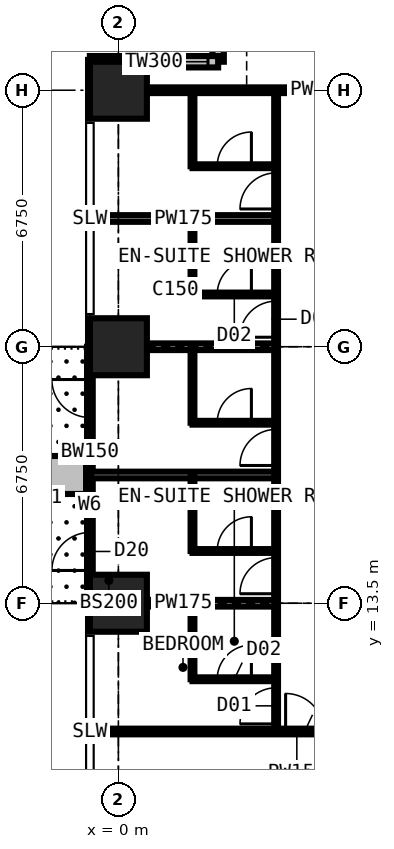
"""IFC4 building model, lengths in metres.
Left out: names, types, materials, properties, quantities, classifications, styles, units other than length and angle.
Written with IfcOpenShell. Run it as: python <this file> out.ifc"""

import sys

from ifc_helpers import new_model, si_unit, direction, frame, frame_2d, origin, origin_2d, place, context, subcontext, project, spatial, rectangle, extrude, element, fill, save


model = new_model("IFC4")
c1 = context("Model", 3, precision=1e-05, world=origin(), true_north=direction((0.0, 1.0)))
c2 = subcontext(c1, "Body", "Model", "MODEL_VIEW")
j1 = project(units=[si_unit("LENGTHUNIT", "METRE"), si_unit("PLANEANGLEUNIT", "RADIAN")], contexts=[c1])
p1 = place(None, origin())
s1 = spatial("IfcSite", under=j1, at=p1, CompositionType="ELEMENT")
p2 = place(p1, origin())
s2 = spatial("IfcBuilding", under=s1, at=p2, CompositionType="ELEMENT")
p3 = place(p2, frame((0.0, 0.0, 108.9)))
s3 = spatial("IfcBuildingStorey", under=s2, at=p3, CompositionType="ELEMENT", Elevation=108.9)
for number, where, z_axis, x_axis in (
    (1, (0.0, 13.5, 0.0), (0.0, 0.0, 1.0), (1.0, 0.0, 0.0)),
    (2, (0.0, 20.25, 0.0), (0.0, 0.0, 1.0), (1.0, 0.0, 0.0)),
    (3, (0.0, 27.0, 0.0), (0.0, 0.0, 1.0), (1.0, 0.0, 0.0)),
):
    element("IfcColumn", number, at=place(p3, frame(where, z_axis=z_axis, x_axis=x_axis)), inside=s3, PredefinedType="COLUMN", context=c2, shape_type="SweptSolid", body=[
        extrude(rectangle(XDim=1.5, YDim=1.5, at=origin_2d()), origin(), (0.0, 0.0, 1.0), 3.6),
    ])
p4 = place(p3, frame((2.625, 31.125, 0.0), z_axis=(0.0, 0.0, 1.0), x_axis=(0.0, -1.0, 0.0)))
e4 = element("IfcWall", 4, at=p4, inside=s3, PredefinedType="SOLIDWALL", context=c2, shape_type="SweptSolid", body=[
    extrude(rectangle(XDim=3.375, YDim=0.3, at=frame_2d((1.688, 0.0))), origin(), (0.0, 0.0, 1.0), 3.375),
])
p5 = place(p4, frame((0.788, 0.0, 0.6)))
e5 = element("IfcOpeningElement", 5, at=p5, cuts=e4, PredefinedType="OPENING", context=c2, shape_type="SweptSolid", body=[
    extrude(rectangle(XDim=1.8, YDim=2.1, at=frame_2d((0.9, 1.05))), frame((0.0, 0.16, 0.0), z_axis=(0.0, -1.0, 0.0), x_axis=(1.0, 0.0, 0.0)), (0.0, 0.0, 1.0), 0.32),
])
p6 = place(p3, frame((2.625, 27.75, 0.0), z_axis=(0.0, 0.0, 1.0), x_axis=(-1.0, 0.0, 0.0)))
e6 = element("IfcWall", 6, at=p6, inside=s3, PredefinedType="SOLIDWALL", context=c2, shape_type="SweptSolid", body=[
    extrude(rectangle(XDim=3.375, YDim=0.3, at=frame_2d((1.688, 0.0))), origin(), (0.0, 0.0, 1.0), 3.375),
])
p7 = place(p6, frame((0.268, 0.0, 0.9)))
e7 = element("IfcOpeningElement", 7, at=p7, cuts=e6, PredefinedType="OPENING", context=c2, shape_type="SweptSolid", body=[
    extrude(rectangle(XDim=1.5, YDim=1.8, at=frame_2d((0.75, 0.9))), frame((0.0, 0.16, 0.0), z_axis=(0.0, -1.0, 0.0), x_axis=(1.0, 0.0, 0.0)), (0.0, 0.0, 1.0), 0.32),
])
p8 = place(p3, frame((-0.75, 13.5, 0.0), z_axis=(0.0, 0.0, 1.0), x_axis=(0.0, 1.0, 0.0)))
e8 = element("IfcWall", 8, at=p8, inside=s3, PredefinedType="SOLIDWALL", context=c2, shape_type="SweptSolid", body=[
    extrude(rectangle(XDim=6.75, YDim=0.15, at=frame_2d((3.375, 0.0))), origin(), (0.0, 0.0, 1.0), 3.375),
])
p9 = place(p8, frame((0.863, 0.0, 0.0)))
e9 = element("IfcOpeningElement", 9, at=p9, cuts=e8, PredefinedType="OPENING", context=c2, shape_type="SweptSolid", body=[
    extrude(rectangle(XDim=1.0, YDim=2.2, at=frame_2d((0.5, 1.1))), frame((0.0, 0.085, 0.0), z_axis=(0.0, -1.0, 0.0), x_axis=(1.0, 0.0, 0.0)), (0.0, 0.0, 1.0), 0.17),
])
p10 = place(p8, frame((1.975, 0.0, 0.9)))
e10 = element("IfcOpeningElement", 10, at=p10, cuts=e8, PredefinedType="OPENING", context=c2, shape_type="SweptSolid", body=[
    extrude(rectangle(XDim=1.2, YDim=1.8, at=frame_2d((0.6, 0.9))), frame((0.0, 0.085, 0.0), z_axis=(0.0, -1.0, 0.0), x_axis=(1.0, 0.0, 0.0)), (0.0, 0.0, 1.0), 0.17),
])
p11 = place(p8, frame((4.887, 0.0, 0.0)))
e11 = element("IfcOpeningElement", 11, at=p11, cuts=e8, PredefinedType="OPENING", context=c2, shape_type="SweptSolid", body=[
    extrude(rectangle(XDim=1.0, YDim=2.2, at=frame_2d((0.5, 1.1))), frame((0.0, 0.085, 0.0), z_axis=(0.0, -1.0, 0.0), x_axis=(1.0, 0.0, 0.0)), (0.0, 0.0, 1.0), 0.17),
])
p12 = place(p8, frame((3.575, 0.0, 0.9)))
e12 = element("IfcOpeningElement", 12, at=p12, cuts=e8, PredefinedType="OPENING", context=c2, shape_type="SweptSolid", body=[
    extrude(rectangle(XDim=1.2, YDim=1.8, at=frame_2d((0.6, 0.9))), frame((0.0, 0.085, 0.0), z_axis=(0.0, -1.0, 0.0), x_axis=(1.0, 0.0, 0.0)), (0.0, 0.0, 1.0), 0.17),
])
p13 = place(p3, frame((-0.85, 16.875, 0.0), z_axis=(0.0, 0.0, 1.0), x_axis=(-1.0, 0.0, 0.0)))
e13 = element("IfcWall", 13, at=p13, inside=s3, PredefinedType="USERDEFINED", context=c2, shape_type="SweptSolid", body=[
    extrude(rectangle(XDim=2.2, YDim=1.0, at=frame_2d((1.1, 0.0))), origin(), (0.0, 0.0, 1.0), 0.9),
])
p14 = place(p3, frame((-0.734, 10.125, 0.0), z_axis=(0.0, 0.0, 1.0), x_axis=(1.0, 0.0, 0.0)))
e14 = element("IfcWall", 14, at=p14, inside=s3, PredefinedType="PARTITIONING", context=c2, shape_type="SweptSolid", body=[
    extrude(rectangle(XDim=10.859, YDim=0.15, at=frame_2d((5.429, 0.0))), origin(), (0.0, 0.0, 1.0), 3.375),
])
p15 = place(p14, frame((5.134, 0.0, 0.0)))
e15 = element("IfcOpeningElement", 15, at=p15, cuts=e14, PredefinedType="OPENING", context=c2, shape_type="SweptSolid", body=[
    extrude(rectangle(XDim=1.0, YDim=2.2, at=frame_2d((0.5, 1.1))), frame((0.0, 0.085, 0.0), z_axis=(0.0, -1.0, 0.0), x_axis=(1.0, 0.0, 0.0)), (0.0, 0.0, 1.0), 0.17),
])
p16 = place(p14, frame((8.234, 0.0, 0.0)))
e16 = element("IfcOpeningElement", 16, at=p16, cuts=e14, PredefinedType="OPENING", context=c2, shape_type="SweptSolid", body=[
    extrude(rectangle(XDim=0.95, YDim=2.2, at=frame_2d((0.475, 1.1))), frame((0.0, 0.085, 0.0), z_axis=(0.0, -1.0, 0.0), x_axis=(1.0, 0.0, 0.0)), (0.0, 0.0, 1.0), 0.17),
])
p17 = place(p3, frame((-0.734, 13.5, 0.0), z_axis=(0.0, 0.0, 1.0), x_axis=(1.0, 0.0, 0.0)))
e17 = element("IfcWall", 17, at=p17, inside=s3, PredefinedType="PARTITIONING", context=c2, shape_type="SweptSolid", body=[
    extrude(rectangle(XDim=4.884, YDim=0.175, at=frame_2d((2.442, 0.0))), origin(), (0.0, 0.0, 1.0), 2.877),
])
p18 = place(p3, frame((-0.734, 16.875, 0.0), z_axis=(0.0, 0.0, 1.0), x_axis=(1.0, 0.0, 0.0)))
e18 = element("IfcWall", 18, at=p18, inside=s3, PredefinedType="PARTITIONING", context=c2, shape_type="SweptSolid", body=[
    extrude(rectangle(XDim=4.884, YDim=0.175, at=frame_2d((2.442, 0.0))), origin(), (0.0, 0.0, 1.0), 3.375),
])
p19 = place(p3, frame((-0.734, 20.25, 0.0), z_axis=(0.0, 0.0, 1.0), x_axis=(1.0, 0.0, 0.0)))
e19 = element("IfcWall", 19, at=p19, inside=s3, PredefinedType="PARTITIONING", context=c2, shape_type="SweptSolid", body=[
    extrude(rectangle(XDim=4.884, YDim=0.175, at=frame_2d((2.442, 0.0))), origin(), (0.0, 0.0, 1.0), 2.877),
])
p20 = place(p3, frame((-0.734, 23.625, 0.0), z_axis=(0.0, 0.0, 1.0), x_axis=(1.0, 0.0, 0.0)))
e20 = element("IfcWall", 20, at=p20, inside=s3, PredefinedType="PARTITIONING", context=c2, shape_type="SweptSolid", body=[
    extrude(rectangle(XDim=4.884, YDim=0.175, at=frame_2d((2.442, 0.0))), origin(), (0.0, 0.0, 1.0), 3.375),
])
p21 = place(p3, frame((-0.734, 27.0, 0.0), z_axis=(0.0, 0.0, 1.0), x_axis=(1.0, 0.0, 0.0)))
e21 = element("IfcWall", 21, at=p21, inside=s3, PredefinedType="PARTITIONING", context=c2, shape_type="SweptSolid", body=[
    extrude(rectangle(XDim=12.034, YDim=0.15, at=frame_2d((6.017, 0.0))), origin(), (0.0, 0.0, 1.0), 2.806),
])
p22 = place(p21, frame((8.234, 0.0, 0.0)))
e22 = element("IfcOpeningElement", 22, at=p22, cuts=e21, PredefinedType="OPENING", context=c2, shape_type="SweptSolid", body=[
    extrude(rectangle(XDim=1.0, YDim=2.2, at=frame_2d((0.5, 1.1))), frame((0.0, 0.085, 0.0), z_axis=(0.0, -1.0, 0.0), x_axis=(1.0, 0.0, 0.0)), (0.0, 0.0, 1.0), 0.17),
])
p23 = place(p3, frame((1.95, 11.5, 0.0), z_axis=(0.0, 0.0, 1.0), x_axis=(0.0, 1.0, 0.0)))
e23 = element("IfcWall", 23, at=p23, inside=s3, PredefinedType="PARTITIONING", context=c2, shape_type="SweptSolid", body=[
    extrude(rectangle(XDim=2.0, YDim=0.1, at=frame_2d((1.0, 0.0))), origin(), (0.0, 0.0, 1.0), 3.375),
])
p24 = place(p3, frame((1.95, 11.5, 0.0), z_axis=(0.0, 0.0, 1.0), x_axis=(1.0, 0.0, 0.0)))
e24 = element("IfcWall", 24, at=p24, inside=s3, PredefinedType="PARTITIONING", context=c2, shape_type="SweptSolid", body=[
    extrude(rectangle(XDim=2.2, YDim=0.1, at=frame_2d((1.1, 0.0))), origin(), (0.0, 0.0, 1.0), 3.375),
])
p25 = place(p24, frame((0.65, 0.0, 0.0)))
e25 = element("IfcOpeningElement", 25, at=p25, cuts=e24, PredefinedType="OPENING", context=c2, shape_type="SweptSolid", body=[
    extrude(rectangle(XDim=0.9, YDim=2.2, at=frame_2d((0.45, 1.1))), frame((0.0, 0.06, 0.0), z_axis=(0.0, -1.0, 0.0), x_axis=(1.0, 0.0, 0.0)), (0.0, 0.0, 1.0), 0.12),
])
p26 = place(p3, frame((1.95, 14.875, 0.0), z_axis=(0.0, 0.0, 1.0), x_axis=(0.0, 1.0, 0.0)))
e26 = element("IfcWall", 26, at=p26, inside=s3, PredefinedType="PARTITIONING", context=c2, shape_type="SweptSolid", body=[
    extrude(rectangle(XDim=2.0, YDim=0.1, at=frame_2d((1.0, 0.0))), origin(), (0.0, 0.0, 1.0), 3.375),
])
p27 = place(p3, frame((1.95, 14.875, 0.0), z_axis=(0.0, 0.0, 1.0), x_axis=(1.0, 0.0, 0.0)))
e27 = element("IfcWall", 27, at=p27, inside=s3, PredefinedType="PARTITIONING", context=c2, shape_type="SweptSolid", body=[
    extrude(rectangle(XDim=2.2, YDim=0.1, at=frame_2d((1.1, 0.0))), origin(), (0.0, 0.0, 1.0), 3.375),
])
p28 = place(p27, frame((0.65, 0.0, 0.0)))
e28 = element("IfcOpeningElement", 28, at=p28, cuts=e27, PredefinedType="OPENING", context=c2, shape_type="SweptSolid", body=[
    extrude(rectangle(XDim=0.9, YDim=2.2, at=frame_2d((0.45, 1.1))), frame((0.0, 0.06, 0.0), z_axis=(0.0, -1.0, 0.0), x_axis=(1.0, 0.0, 0.0)), (0.0, 0.0, 1.0), 0.12),
])
p29 = place(p3, frame((1.95, 18.25, 0.0), z_axis=(0.0, 0.0, 1.0), x_axis=(0.0, 1.0, 0.0)))
e29 = element("IfcWall", 29, at=p29, inside=s3, PredefinedType="PARTITIONING", context=c2, shape_type="SweptSolid", body=[
    extrude(rectangle(XDim=2.0, YDim=0.1, at=frame_2d((1.0, 0.0))), origin(), (0.0, 0.0, 1.0), 3.375),
])
p30 = place(p3, frame((1.95, 18.25, 0.0), z_axis=(0.0, 0.0, 1.0), x_axis=(1.0, 0.0, 0.0)))
e30 = element("IfcWall", 30, at=p30, inside=s3, PredefinedType="PARTITIONING", context=c2, shape_type="SweptSolid", body=[
    extrude(rectangle(XDim=2.2, YDim=0.1, at=frame_2d((1.1, 0.0))), origin(), (0.0, 0.0, 1.0), 3.375),
])
p31 = place(p30, frame((0.65, 0.0, 0.0)))
e31 = element("IfcOpeningElement", 31, at=p31, cuts=e30, PredefinedType="OPENING", context=c2, shape_type="SweptSolid", body=[
    extrude(rectangle(XDim=0.9, YDim=2.2, at=frame_2d((0.45, 1.1))), frame((0.0, 0.06, 0.0), z_axis=(0.0, -1.0, 0.0), x_axis=(1.0, 0.0, 0.0)), (0.0, 0.0, 1.0), 0.12),
])
p32 = place(p3, frame((1.95, 21.625, 0.0), z_axis=(0.0, 0.0, 1.0), x_axis=(0.0, 1.0, 0.0)))
e32 = element("IfcWall", 32, at=p32, inside=s3, PredefinedType="PARTITIONING", context=c2, shape_type="SweptSolid", body=[
    extrude(rectangle(XDim=2.0, YDim=0.1, at=frame_2d((1.0, 0.0))), origin(), (0.0, 0.0, 1.0), 3.375),
])
p33 = place(p3, frame((1.95, 21.625, 0.0), z_axis=(0.0, 0.0, 1.0), x_axis=(1.0, 0.0, 0.0)))
e33 = element("IfcWall", 33, at=p33, inside=s3, PredefinedType="PARTITIONING", context=c2, shape_type="SweptSolid", body=[
    extrude(rectangle(XDim=2.2, YDim=0.1, at=frame_2d((1.1, 0.0))), origin(), (0.0, 0.0, 1.0), 3.375),
])
p34 = place(p33, frame((0.65, 0.0, 0.0)))
e34 = element("IfcOpeningElement", 34, at=p34, cuts=e33, PredefinedType="OPENING", context=c2, shape_type="SweptSolid", body=[
    extrude(rectangle(XDim=0.9, YDim=2.2, at=frame_2d((0.45, 1.1))), frame((0.0, 0.06, 0.0), z_axis=(0.0, -1.0, 0.0), x_axis=(1.0, 0.0, 0.0)), (0.0, 0.0, 1.0), 0.12),
])
p35 = place(p3, frame((1.95, 25.0, 0.0), z_axis=(0.0, 0.0, 1.0), x_axis=(0.0, 1.0, 0.0)))
e35 = element("IfcWall", 35, at=p35, inside=s3, PredefinedType="PARTITIONING", context=c2, shape_type="SweptSolid", body=[
    extrude(rectangle(XDim=2.0, YDim=0.1, at=frame_2d((1.0, 0.0))), origin(), (0.0, 0.0, 1.0), 3.375),
])
p36 = place(p3, frame((1.95, 25.0, 0.0), z_axis=(0.0, 0.0, 1.0), x_axis=(1.0, 0.0, 0.0)))
e36 = element("IfcWall", 36, at=p36, inside=s3, PredefinedType="PARTITIONING", context=c2, shape_type="SweptSolid", body=[
    extrude(rectangle(XDim=2.2, YDim=0.1, at=frame_2d((1.1, 0.0))), origin(), (0.0, 0.0, 1.0), 3.375),
])
p37 = place(p36, frame((0.65, 0.0, 0.0)))
e37 = element("IfcOpeningElement", 37, at=p37, cuts=e36, PredefinedType="OPENING", context=c2, shape_type="SweptSolid", body=[
    extrude(rectangle(XDim=0.9, YDim=2.2, at=frame_2d((0.45, 1.1))), frame((0.0, 0.06, 0.0), z_axis=(0.0, -1.0, 0.0), x_axis=(1.0, 0.0, 0.0)), (0.0, 0.0, 1.0), 0.12),
])
p38 = place(p3, frame((4.15, 10.125, 0.0), z_axis=(0.0, 0.0, 1.0), x_axis=(0.0, 1.0, 0.0)))
e38 = element("IfcWall", 38, at=p38, inside=s3, PredefinedType="PARTITIONING", context=c2, shape_type="SweptSolid", body=[
    extrude(rectangle(XDim=16.875, YDim=0.1, at=frame_2d((8.438, 0.0))), origin(), (0.0, 0.0, 1.0), 3.375),
])
p39 = place(p38, frame((0.2, 0.0, 0.0)))
e39 = element("IfcOpeningElement", 39, at=p39, cuts=e38, PredefinedType="OPENING", context=c2, shape_type="SweptSolid", body=[
    extrude(rectangle(XDim=0.95, YDim=2.2, at=frame_2d((0.475, 1.1))), frame((0.0, 0.06, 0.0), z_axis=(0.0, -1.0, 0.0), x_axis=(1.0, 0.0, 0.0)), (0.0, 0.0, 1.0), 0.12),
])
p40 = place(p38, frame((3.625, 0.0, 0.0)))
e40 = element("IfcOpeningElement", 40, at=p40, cuts=e38, PredefinedType="OPENING", context=c2, shape_type="SweptSolid", body=[
    extrude(rectangle(XDim=0.95, YDim=2.2, at=frame_2d((0.475, 1.1))), frame((0.0, 0.06, 0.0), z_axis=(0.0, -1.0, 0.0), x_axis=(1.0, 0.0, 0.0)), (0.0, 0.0, 1.0), 0.12),
])
p41 = place(p38, frame((7.0, 0.0, 0.0)))
e41 = element("IfcOpeningElement", 41, at=p41, cuts=e38, PredefinedType="OPENING", context=c2, shape_type="SweptSolid", body=[
    extrude(rectangle(XDim=0.95, YDim=2.2, at=frame_2d((0.475, 1.1))), frame((0.0, 0.06, 0.0), z_axis=(0.0, -1.0, 0.0), x_axis=(1.0, 0.0, 0.0)), (0.0, 0.0, 1.0), 0.12),
])
p42 = place(p38, frame((10.375, 0.0, 0.0)))
e42 = element("IfcOpeningElement", 42, at=p42, cuts=e38, PredefinedType="OPENING", context=c2, shape_type="SweptSolid", body=[
    extrude(rectangle(XDim=0.95, YDim=2.2, at=frame_2d((0.475, 1.1))), frame((0.0, 0.06, 0.0), z_axis=(0.0, -1.0, 0.0), x_axis=(1.0, 0.0, 0.0)), (0.0, 0.0, 1.0), 0.12),
])
p43 = place(p38, frame((13.75, 0.0, 0.0)))
e43 = element("IfcOpeningElement", 43, at=p43, cuts=e38, PredefinedType="OPENING", context=c2, shape_type="SweptSolid", body=[
    extrude(rectangle(XDim=0.95, YDim=2.2, at=frame_2d((0.475, 1.1))), frame((0.0, 0.06, 0.0), z_axis=(0.0, -1.0, 0.0), x_axis=(1.0, 0.0, 0.0)), (0.0, 0.0, 1.0), 0.12),
])
p44 = place(p7, origin())
e44 = element("IfcWindow", 44, at=p44, inside=s3, PartitioningType="SINGLE_PANEL", PredefinedType="WINDOW", context=c2, shape_type="SweptSolid", body=[
    extrude(rectangle(XDim=1.5, YDim=1.8, at=frame_2d((0.75, 0.9))), frame((0.0, 0.03, 0.0), z_axis=(0.0, -1.0, 0.0), x_axis=(1.0, 0.0, 0.0)), (0.0, 0.0, 1.0), 0.06),
])
fill(e7, e44)
p45 = place(p9, origin())
e45 = element("IfcDoor", 45, at=p45, inside=s3, OperationType="SINGLE_SWING_LEFT", PredefinedType="DOOR", context=c2, shape_type="SweptSolid", body=[
    extrude(rectangle(XDim=1.0, YDim=2.2, at=frame_2d((0.5, 1.1))), frame((0.0, 0.025, 0.0), z_axis=(0.0, -1.0, 0.0), x_axis=(1.0, 0.0, 0.0)), (0.0, 0.0, 1.0), 0.05),
])
fill(e9, e45)
p46 = place(p10, origin())
e46 = element("IfcWindow", 46, at=p46, inside=s3, PartitioningType="SINGLE_PANEL", PredefinedType="WINDOW", context=c2, shape_type="SweptSolid", body=[
    extrude(rectangle(XDim=1.2, YDim=1.8, at=frame_2d((0.6, 0.9))), frame((0.0, 0.03, 0.0), z_axis=(0.0, -1.0, 0.0), x_axis=(1.0, 0.0, 0.0)), (0.0, 0.0, 1.0), 0.06),
])
fill(e10, e46)
p47 = place(p11, origin())
e47 = element("IfcDoor", 47, at=p47, inside=s3, OperationType="SINGLE_SWING_RIGHT", PredefinedType="DOOR", context=c2, shape_type="SweptSolid", body=[
    extrude(rectangle(XDim=1.0, YDim=2.2, at=frame_2d((0.5, 1.1))), frame((0.0, 0.025, 0.0), z_axis=(0.0, -1.0, 0.0), x_axis=(1.0, 0.0, 0.0)), (0.0, 0.0, 1.0), 0.05),
])
fill(e11, e47)
p48 = place(p12, origin())
e48 = element("IfcWindow", 48, at=p48, inside=s3, PartitioningType="SINGLE_PANEL", PredefinedType="WINDOW", context=c2, shape_type="SweptSolid", body=[
    extrude(rectangle(XDim=1.2, YDim=1.8, at=frame_2d((0.6, 0.9))), frame((0.0, 0.03, 0.0), z_axis=(0.0, -1.0, 0.0), x_axis=(1.0, 0.0, 0.0)), (0.0, 0.0, 1.0), 0.06),
])
fill(e12, e48)
p49 = place(p15, origin())
e49 = element("IfcDoor", 49, at=p49, inside=s3, OperationType="SINGLE_SWING_LEFT", PredefinedType="DOOR", context=c2, shape_type="SweptSolid", body=[
    extrude(rectangle(XDim=1.0, YDim=2.2, at=frame_2d((0.5, 1.1))), frame((0.0, 0.025, 0.0), z_axis=(0.0, -1.0, 0.0), x_axis=(1.0, 0.0, 0.0)), (0.0, 0.0, 1.0), 0.05),
])
fill(e15, e49)
p50 = place(p39, origin())
e50 = element("IfcDoor", 50, at=p50, inside=s3, OperationType="SINGLE_SWING_LEFT", PredefinedType="DOOR", context=c2, shape_type="SweptSolid", body=[
    extrude(rectangle(XDim=0.95, YDim=2.2, at=frame_2d((0.475, 1.1))), frame((0.0, 0.025, 0.0), z_axis=(0.0, -1.0, 0.0), x_axis=(1.0, 0.0, 0.0)), (0.0, 0.0, 1.0), 0.05),
])
fill(e39, e50)
p51 = place(p25, origin())
e51 = element("IfcDoor", 51, at=p51, inside=s3, OperationType="SINGLE_SWING_RIGHT", PredefinedType="DOOR", context=c2, shape_type="SweptSolid", body=[
    extrude(rectangle(XDim=0.9, YDim=2.2, at=frame_2d((0.45, 1.1))), frame((0.0, 0.025, 0.0), z_axis=(0.0, -1.0, 0.0), x_axis=(1.0, 0.0, 0.0)), (0.0, 0.0, 1.0), 0.05),
])
fill(e25, e51)
p52 = place(p40, origin())
e52 = element("IfcDoor", 52, at=p52, inside=s3, OperationType="SINGLE_SWING_LEFT", PredefinedType="DOOR", context=c2, shape_type="SweptSolid", body=[
    extrude(rectangle(XDim=0.95, YDim=2.2, at=frame_2d((0.475, 1.1))), frame((0.0, 0.025, 0.0), z_axis=(0.0, -1.0, 0.0), x_axis=(1.0, 0.0, 0.0)), (0.0, 0.0, 1.0), 0.05),
])
fill(e40, e52)
p53 = place(p28, origin())
e53 = element("IfcDoor", 53, at=p53, inside=s3, OperationType="SINGLE_SWING_RIGHT", PredefinedType="DOOR", context=c2, shape_type="SweptSolid", body=[
    extrude(rectangle(XDim=0.9, YDim=2.2, at=frame_2d((0.45, 1.1))), frame((0.0, 0.025, 0.0), z_axis=(0.0, -1.0, 0.0), x_axis=(1.0, 0.0, 0.0)), (0.0, 0.0, 1.0), 0.05),
])
fill(e28, e53)
p54 = place(p41, origin())
e54 = element("IfcDoor", 54, at=p54, inside=s3, OperationType="SINGLE_SWING_LEFT", PredefinedType="DOOR", context=c2, shape_type="SweptSolid", body=[
    extrude(rectangle(XDim=0.95, YDim=2.2, at=frame_2d((0.475, 1.1))), frame((0.0, 0.025, 0.0), z_axis=(0.0, -1.0, 0.0), x_axis=(1.0, 0.0, 0.0)), (0.0, 0.0, 1.0), 0.05),
])
fill(e41, e54)
p55 = place(p31, origin())
e55 = element("IfcDoor", 55, at=p55, inside=s3, OperationType="SINGLE_SWING_RIGHT", PredefinedType="DOOR", context=c2, shape_type="SweptSolid", body=[
    extrude(rectangle(XDim=0.9, YDim=2.2, at=frame_2d((0.45, 1.1))), frame((0.0, 0.025, 0.0), z_axis=(0.0, -1.0, 0.0), x_axis=(1.0, 0.0, 0.0)), (0.0, 0.0, 1.0), 0.05),
])
fill(e31, e55)
p56 = place(p42, origin())
e56 = element("IfcDoor", 56, at=p56, inside=s3, OperationType="SINGLE_SWING_LEFT", PredefinedType="DOOR", context=c2, shape_type="SweptSolid", body=[
    extrude(rectangle(XDim=0.95, YDim=2.2, at=frame_2d((0.475, 1.1))), frame((0.0, 0.025, 0.0), z_axis=(0.0, -1.0, 0.0), x_axis=(1.0, 0.0, 0.0)), (0.0, 0.0, 1.0), 0.05),
])
fill(e42, e56)
p57 = place(p34, origin())
e57 = element("IfcDoor", 57, at=p57, inside=s3, OperationType="SINGLE_SWING_RIGHT", PredefinedType="DOOR", context=c2, shape_type="SweptSolid", body=[
    extrude(rectangle(XDim=0.9, YDim=2.2, at=frame_2d((0.45, 1.1))), frame((0.0, 0.025, 0.0), z_axis=(0.0, -1.0, 0.0), x_axis=(1.0, 0.0, 0.0)), (0.0, 0.0, 1.0), 0.05),
])
fill(e34, e57)
p58 = place(p43, origin())
e58 = element("IfcDoor", 58, at=p58, inside=s3, OperationType="SINGLE_SWING_LEFT", PredefinedType="DOOR", context=c2, shape_type="SweptSolid", body=[
    extrude(rectangle(XDim=0.95, YDim=2.2, at=frame_2d((0.475, 1.1))), frame((0.0, 0.025, 0.0), z_axis=(0.0, -1.0, 0.0), x_axis=(1.0, 0.0, 0.0)), (0.0, 0.0, 1.0), 0.05),
])
fill(e43, e58)
p59 = place(p37, origin())
e59 = element("IfcDoor", 59, at=p59, inside=s3, OperationType="SINGLE_SWING_RIGHT", PredefinedType="DOOR", context=c2, shape_type="SweptSolid", body=[
    extrude(rectangle(XDim=0.9, YDim=2.2, at=frame_2d((0.45, 1.1))), frame((0.0, 0.025, 0.0), z_axis=(0.0, -1.0, 0.0), x_axis=(1.0, 0.0, 0.0)), (0.0, 0.0, 1.0), 0.05),
])
fill(e37, e59)
save(model, sys.argv[1])
